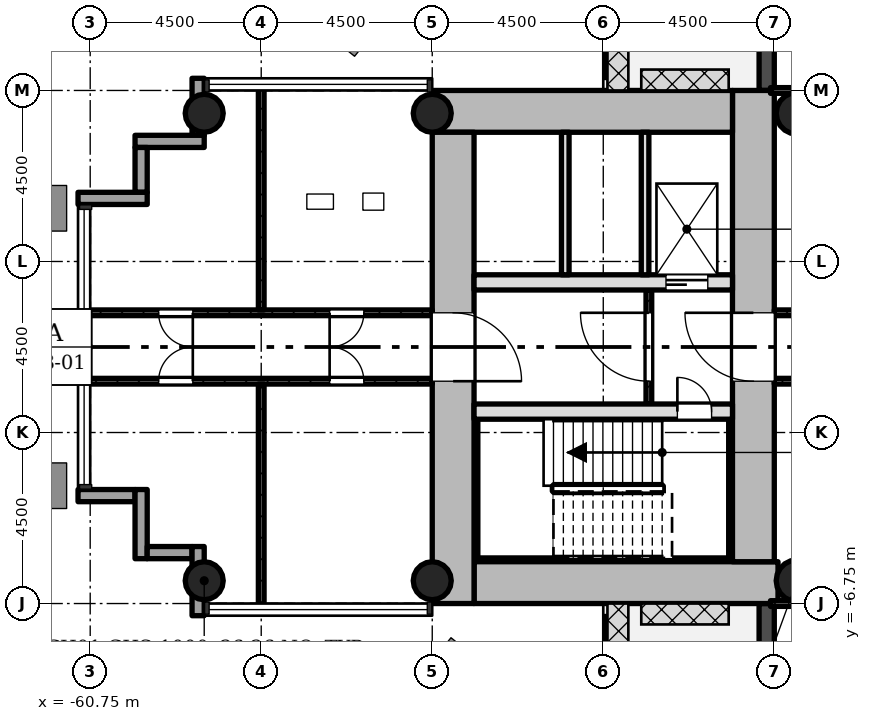
"""IFC4 building model, lengths in metres.
Left out: names, types, materials, properties, quantities, classifications, styles, units other than length and angle.
Written with IfcOpenShell. Run it as: python <this file> out.ifc"""

import sys

from ifc_helpers import new_model, si_unit, direction, frame, frame_2d, origin, origin_2d, place, context, subcontext, project, spatial, rectangle, hollow_circle, extrude, element, fill, save


model = new_model("IFC4")
c1 = context("Model", 3, precision=1e-05, world=origin(), true_north=direction((0.0, 1.0)))
c2 = subcontext(c1, "Body", "Model", "MODEL_VIEW")
j1 = project(units=[si_unit("LENGTHUNIT", "METRE"), si_unit("PLANEANGLEUNIT", "RADIAN")], contexts=[c1])
p1 = place(None, origin())
s1 = spatial("IfcSite", under=j1, at=p1, CompositionType="ELEMENT")
p2 = place(p1, origin())
s2 = spatial("IfcBuilding", under=s1, at=p2, CompositionType="ELEMENT")
p3 = place(p2, frame((0.0, 0.0, 72.1)))
s3 = spatial("IfcBuildingStorey", under=s2, at=p3, CompositionType="ELEMENT", Elevation=72.1)
p4 = place(p3, frame((-50.65, -6.2, 0.0), z_axis=(0.0, 0.0, 1.0), x_axis=(1.0, 0.0, 0.0)))
e1 = element("IfcWall", 1, at=p4, inside=s3, PredefinedType="SHEAR", context=c2, shape_type="SweptSolid", body=[
    extrude(rectangle(XDim=7.998, YDim=1.1, at=frame_2d((3.999, 0.0))), origin(), (0.0, 0.0, 1.0), 4.5),
])
p5 = place(p3, frame((-43.3, -5.65, 0.0), z_axis=(0.0, 0.0, 1.0), x_axis=(0.0, 1.0, 0.0)))
e2 = element("IfcWall", 2, at=p5, inside=s3, PredefinedType="SHEAR", context=c2, shape_type="SweptSolid", body=[
    extrude(rectangle(XDim=12.4, YDim=1.1, at=frame_2d((6.2, 0.0))), origin(), (0.0, 0.0, 1.0), 4.5),
])
p6 = place(p5, frame((4.75, 0.0, 0.0)))
e3 = element("IfcOpeningElement", 3, at=p6, cuts=e2, PredefinedType="OPENING", context=c2, shape_type="SweptSolid", body=[
    extrude(rectangle(XDim=1.8, YDim=2.1, at=frame_2d((0.9, 1.05))), frame((0.0, 0.56, 0.0), z_axis=(0.0, -1.0, 0.0), x_axis=(1.0, 0.0, 0.0)), (0.0, 0.0, 1.0), 1.12),
])
p7 = place(p3, frame((-43.85, 6.2, 0.0), z_axis=(0.0, 0.0, 1.0), x_axis=(-1.0, 0.0, 0.0)))
e4 = element("IfcWall", 4, at=p7, inside=s3, PredefinedType="SHEAR", context=c2, shape_type="SweptSolid", body=[
    extrude(rectangle(XDim=7.9, YDim=1.1, at=frame_2d((3.95, 0.0))), origin(), (0.0, 0.0, 1.0), 4.5),
])
p8 = place(p3, frame((-51.2, 5.65, 0.0), z_axis=(0.0, 0.0, 1.0), x_axis=(0.0, -1.0, 0.0)))
e5 = element("IfcWall", 5, at=p8, inside=s3, PredefinedType="SHEAR", context=c2, shape_type="SweptSolid", body=[
    extrude(rectangle(XDim=12.4, YDim=1.1, at=frame_2d((6.2, 0.0))), origin(), (0.0, 0.0, 1.0), 4.5),
])
p9 = place(p8, frame((4.75, 0.0, 0.0)))
e6 = element("IfcOpeningElement", 6, at=p9, cuts=e5, PredefinedType="OPENING", context=c2, shape_type="SweptSolid", body=[
    extrude(rectangle(XDim=1.8, YDim=2.1, at=frame_2d((0.9, 1.05))), frame((0.0, 0.56, 0.0), z_axis=(0.0, -1.0, 0.0), x_axis=(1.0, 0.0, 0.0)), (0.0, 0.0, 1.0), 1.12),
])
p10 = place(p3, frame((-50.65, -1.7, 0.0), z_axis=(0.0, 0.0, 1.0), x_axis=(1.0, 0.0, 0.0)))
e7 = element("IfcWall", 7, at=p10, inside=s3, PredefinedType="SHEAR", context=c2, shape_type="SweptSolid", body=[
    extrude(rectangle(XDim=6.8, YDim=0.4, at=frame_2d((3.4, 0.0))), origin(), (0.0, 0.0, 1.0), 4.5),
])
p11 = place(p10, frame((5.35, 0.0, 0.0)))
e8 = element("IfcOpeningElement", 8, at=p11, cuts=e7, PredefinedType="OPENING", context=c2, shape_type="SweptSolid", body=[
    extrude(rectangle(XDim=0.9, YDim=2.1, at=frame_2d((0.45, 1.05))), frame((0.0, 0.21, 0.0), z_axis=(0.0, -1.0, 0.0), x_axis=(1.0, 0.0, 0.0)), (0.0, 0.0, 1.0), 0.42),
])
p12 = place(p3, frame((-50.65, 1.7, 0.0), z_axis=(0.0, 0.0, 1.0), x_axis=(1.0, 0.0, 0.0)))
e9 = element("IfcWall", 9, at=p12, inside=s3, PredefinedType="SHEAR", context=c2, shape_type="SweptSolid", body=[
    extrude(rectangle(XDim=6.8, YDim=0.4, at=frame_2d((3.4, 0.0))), origin(), (0.0, 0.0, 1.0), 4.5),
])
p13 = place(p12, frame((5.05, 0.0, 0.0)))
e10 = element("IfcOpeningElement", 10, at=p13, cuts=e9, PredefinedType="OPENING", context=c2, shape_type="SweptSolid", body=[
    extrude(rectangle(XDim=1.1, YDim=2.1, at=frame_2d((0.55, 1.05))), frame((0.0, 0.21, 0.0), z_axis=(0.0, -1.0, 0.0), x_axis=(1.0, 0.0, 0.0)), (0.0, 0.0, 1.0), 0.42),
])
for number, where, z_axis, x_axis in (
    (11, (-51.75, -6.15, 0.0), (0.0, 0.0, 1.0), (1.0, 0.0, 0.0)),
    (12, (-51.75, 6.15, 0.0), (0.0, 0.0, 1.0), (1.0, 0.0, 0.0)),
    (13, (-57.75, -6.15, 0.0), (0.0, 0.0, 1.0), (1.0, 0.0, 0.0)),
    (14, (-57.75, 6.15, 0.0), (0.0, 0.0, 1.0), (1.0, 0.0, 0.0)),
):
    element("IfcColumn", number, at=place(p3, frame(where, z_axis=z_axis, x_axis=x_axis)), inside=s3, PredefinedType="COLUMN", context=c2, shape_type="SweptSolid", body=[
        extrude(hollow_circle(Radius=0.5, WallThickness=0.036, at=origin_2d()), origin(), (0.0, 0.0, 1.0), 4.5),
    ])
for number, where, z_axis, x_axis in (
    (15, (-42.15, -6.15, 0.0), (0.0, 0.0, 1.0), (1.0, 0.0, 0.0)),
    (16, (-42.15, 6.15, 0.0), (0.0, 0.0, 1.0), (1.0, 0.0, 0.0)),
):
    element("IfcColumn", number, at=place(p3, frame(where, z_axis=z_axis, x_axis=x_axis)), inside=s3, PredefinedType="COLUMN", context=c2, shape_type="SweptSolid", body=[
        extrude(hollow_circle(Radius=0.55, WallThickness=0.04, at=origin_2d()), origin(), (0.0, 0.0, 1.0), 4.5),
    ])
p14 = place(p3, frame((-61.07, -3.91, -0.3), z_axis=(0.0, 0.0, 1.0), x_axis=(1.0, 0.0, 0.0)))
e17 = element("IfcWall", 17, at=p14, inside=s3, PredefinedType="STANDARD", context=c2, shape_type="SweptSolid", body=[
    extrude(rectangle(XDim=1.5, YDim=0.32, at=frame_2d((0.75, 0.0))), origin(), (0.0, 0.0, 1.0), 4.5),
])
p15 = place(p3, frame((-59.41, -3.75, -0.3), z_axis=(0.0, 0.0, 1.0), x_axis=(0.0, -1.0, 0.0)))
e18 = element("IfcWall", 18, at=p15, inside=s3, PredefinedType="STANDARD", context=c2, shape_type="SweptSolid", body=[
    extrude(rectangle(XDim=1.82, YDim=0.32, at=frame_2d((0.91, 0.0))), origin(), (0.0, 0.0, 1.0), 4.5),
])
p16 = place(p3, frame((-59.25, -5.41, -0.3), z_axis=(0.0, 0.0, 1.0), x_axis=(1.0, 0.0, 0.0)))
e19 = element("IfcWall", 19, at=p16, inside=s3, PredefinedType="STANDARD", context=c2, shape_type="SweptSolid", body=[
    extrude(rectangle(XDim=1.18, YDim=0.32, at=frame_2d((0.59, 0.0))), origin(), (0.0, 0.0, 1.0), 4.5),
])
p17 = place(p3, frame((-57.91, -5.25, -0.3), z_axis=(0.0, 0.0, 1.0), x_axis=(0.0, -1.0, 0.0)))
e20 = element("IfcWall", 20, at=p17, inside=s3, PredefinedType="STANDARD", context=c2, shape_type="SweptSolid", body=[
    extrude(rectangle(XDim=1.82, YDim=0.32, at=frame_2d((0.91, 0.0))), origin(), (0.0, 0.0, 1.0), 4.5),
])
p18 = place(p3, frame((-42.95, -6.75, -0.02), z_axis=(0.0, 0.0, 1.0), x_axis=(0.0, -1.0, 0.0)))
e21 = element("IfcWall", 21, at=p18, inside=s3, PredefinedType="STANDARD", context=c2, shape_type="SweptSolid", body=[
    extrude(rectangle(XDim=4.5, YDim=0.4, at=frame_2d((2.25, 0.0))), origin(), (0.0, 0.0, 1.0), 4.22),
])
p19 = place(p18, frame((1.35, 0.0, 0.02)))
e22 = element("IfcOpeningElement", 22, at=p19, cuts=e21, PredefinedType="OPENING", context=c2, shape_type="SweptSolid", body=[
    extrude(rectangle(XDim=1.8, YDim=2.1, at=frame_2d((0.9, 1.05))), frame((0.0, 0.21, 0.0), z_axis=(0.0, -1.0, 0.0), x_axis=(1.0, 0.0, 0.0)), (0.0, 0.0, 1.0), 0.42),
])
p20 = place(p3, frame((-42.95, 11.25, -0.02), z_axis=(0.0, 0.0, 1.0), x_axis=(0.0, -1.0, 0.0)))
e23 = element("IfcWall", 23, at=p20, inside=s3, PredefinedType="STANDARD", context=c2, shape_type="SweptSolid", body=[
    extrude(rectangle(XDim=4.5, YDim=0.4, at=frame_2d((2.25, 0.0))), origin(), (0.0, 0.0, 1.0), 4.22),
])
p21 = place(p20, frame((1.35, 0.0, 0.02)))
e24 = element("IfcOpeningElement", 24, at=p21, cuts=e23, PredefinedType="OPENING", context=c2, shape_type="SweptSolid", body=[
    extrude(rectangle(XDim=1.8, YDim=2.1, at=frame_2d((0.9, 1.05))), frame((0.0, 0.21, 0.0), z_axis=(0.0, -1.0, 0.0), x_axis=(1.0, 0.0, 0.0)), (0.0, 0.0, 1.0), 0.42),
])
p22 = place(p3, frame((-57.91, 7.07, -0.3), z_axis=(0.0, 0.0, 1.0), x_axis=(0.0, -1.0, 0.0)))
e25 = element("IfcWall", 25, at=p22, inside=s3, PredefinedType="STANDARD", context=c2, shape_type="SweptSolid", body=[
    extrude(rectangle(XDim=1.5, YDim=0.32, at=frame_2d((0.75, 0.0))), origin(), (0.0, 0.0, 1.0), 4.5),
])
p23 = place(p3, frame((-57.75, 5.41, -0.3), z_axis=(0.0, 0.0, 1.0), x_axis=(-1.0, 0.0, 0.0)))
e26 = element("IfcWall", 26, at=p23, inside=s3, PredefinedType="STANDARD", context=c2, shape_type="SweptSolid", body=[
    extrude(rectangle(XDim=1.82, YDim=0.32, at=frame_2d((0.91, 0.0))), origin(), (0.0, 0.0, 1.0), 4.5),
])
p24 = place(p3, frame((-59.41, 5.25, -0.3), z_axis=(0.0, 0.0, 1.0), x_axis=(0.0, -1.0, 0.0)))
e27 = element("IfcWall", 27, at=p24, inside=s3, PredefinedType="STANDARD", context=c2, shape_type="SweptSolid", body=[
    extrude(rectangle(XDim=1.18, YDim=0.32, at=frame_2d((0.59, 0.0))), origin(), (0.0, 0.0, 1.0), 4.5),
])
p25 = place(p3, frame((-59.25, 3.91, -0.3), z_axis=(0.0, 0.0, 1.0), x_axis=(-1.0, 0.0, 0.0)))
e28 = element("IfcWall", 28, at=p25, inside=s3, PredefinedType="STANDARD", context=c2, shape_type="SweptSolid", body=[
    extrude(rectangle(XDim=1.82, YDim=0.32, at=frame_2d((0.91, 0.0))), origin(), (0.0, 0.0, 1.0), 4.5),
])
p26 = place(p3, frame((-46.05, 1.5, 0.0), z_axis=(0.0, 0.0, 1.0), x_axis=(0.0, -1.0, 0.0)))
e29 = element("IfcWall", 29, at=p26, inside=s3, PredefinedType="PARTITIONING", context=c2, shape_type="SweptSolid", body=[
    extrude(rectangle(XDim=3.0, YDim=0.15, at=frame_2d((1.5, 0.0))), origin(), (0.0, 0.0, 1.0), 4.08),
])
p27 = place(p26, frame((0.6, 0.0, 0.0)))
e30 = element("IfcOpeningElement", 30, at=p27, cuts=e29, PredefinedType="OPENING", context=c2, shape_type="SweptSolid", body=[
    extrude(rectangle(XDim=1.8, YDim=2.1, at=frame_2d((0.9, 1.05))), frame((0.0, 0.085, 0.0), z_axis=(0.0, -1.0, 0.0), x_axis=(1.0, 0.0, 0.0)), (0.0, 0.0, 1.0), 0.17),
])
for number, where, z_axis, x_axis in (
    (31, (-46.15, 5.65, 0.0), (0.0, 0.0, 1.0), (0.0, -1.0, 0.0)),
    (32, (-48.25, 5.65, 0.0), (0.0, 0.0, 1.0), (0.0, -1.0, 0.0)),
):
    element("IfcWall", number, at=place(p3, frame(where, z_axis=z_axis, x_axis=x_axis)), inside=s3, PredefinedType="SOLIDWALL", context=c2, shape_type="SweptSolid", body=[
        extrude(rectangle(XDim=3.75, YDim=0.2, at=frame_2d((1.875, 0.0))), origin(), (0.0, 0.0, 1.0), 4.08),
    ])
p28 = place(p3, frame((-42.75, 0.9, 0.0), z_axis=(0.0, 0.0, 1.0), x_axis=(1.0, 0.0, 0.0)))
e33 = element("IfcWall", 33, at=p28, inside=s3, PredefinedType="PARTITIONING", context=c2, shape_type="SweptSolid", body=[
    extrude(rectangle(XDim=5.85, YDim=0.15, at=frame_2d((2.925, 0.0))), origin(), (0.0, 0.0, 1.0), 4.08),
])
p29 = place(p28, frame((2.475, 0.0, 0.0)))
e34 = element("IfcOpeningElement", 34, at=p29, cuts=e33, PredefinedType="OPENING", context=c2, shape_type="SweptSolid", body=[
    extrude(rectangle(XDim=0.9, YDim=2.1, at=frame_2d((0.45, 1.05))), frame((0.0, 0.085, 0.0), z_axis=(0.0, -1.0, 0.0), x_axis=(1.0, 0.0, 0.0)), (0.0, 0.0, 1.0), 0.17),
])
p30 = place(p3, frame((-42.75, -0.9, 0.0), z_axis=(0.0, 0.0, 1.0), x_axis=(1.0, 0.0, 0.0)))
e35 = element("IfcWall", 35, at=p30, inside=s3, PredefinedType="PARTITIONING", context=c2, shape_type="SweptSolid", body=[
    extrude(rectangle(XDim=5.85, YDim=0.15, at=frame_2d((2.925, 0.0))), origin(), (0.0, 0.0, 1.0), 4.08),
])
p31 = place(p30, frame((2.475, 0.0, 0.0)))
e36 = element("IfcOpeningElement", 36, at=p31, cuts=e35, PredefinedType="OPENING", context=c2, shape_type="SweptSolid", body=[
    extrude(rectangle(XDim=0.9, YDim=2.1, at=frame_2d((0.45, 1.05))), frame((0.0, 0.085, 0.0), z_axis=(0.0, -1.0, 0.0), x_axis=(1.0, 0.0, 0.0)), (0.0, 0.0, 1.0), 0.17),
])
p32 = place(p3, frame((-60.85, 0.9, 0.0), z_axis=(0.0, 0.0, 1.0), x_axis=(1.0, 0.0, 0.0)))
e37 = element("IfcWall", 37, at=p32, inside=s3, PredefinedType="PARTITIONING", context=c2, shape_type="SweptSolid", body=[
    extrude(rectangle(XDim=9.1, YDim=0.15, at=frame_2d((4.55, 0.0))), origin(), (0.0, 0.0, 1.0), 4.08),
])
p33 = place(p32, frame((1.9, 0.0, 0.0)))
e38 = element("IfcOpeningElement", 38, at=p33, cuts=e37, PredefinedType="OPENING", context=c2, shape_type="SweptSolid", body=[
    extrude(rectangle(XDim=0.9, YDim=2.1, at=frame_2d((0.45, 1.05))), frame((0.0, 0.085, 0.0), z_axis=(0.0, -1.0, 0.0), x_axis=(1.0, 0.0, 0.0)), (0.0, 0.0, 1.0), 0.17),
])
p34 = place(p32, frame((6.4, 0.0, 0.0)))
e39 = element("IfcOpeningElement", 39, at=p34, cuts=e37, PredefinedType="OPENING", context=c2, shape_type="SweptSolid", body=[
    extrude(rectangle(XDim=0.9, YDim=2.1, at=frame_2d((0.45, 1.05))), frame((0.0, 0.085, 0.0), z_axis=(0.0, -1.0, 0.0), x_axis=(1.0, 0.0, 0.0)), (0.0, 0.0, 1.0), 0.17),
])
p35 = place(p3, frame((-56.25, 0.975, 0.0), z_axis=(0.0, 0.0, 1.0), x_axis=(0.0, 1.0, 0.0)))
e40 = element("IfcWall", 40, at=p35, inside=s3, PredefinedType="PARTITIONING", context=c2, shape_type="SweptSolid", body=[
    extrude(rectangle(XDim=5.875, YDim=0.15, at=frame_2d((2.938, 0.0))), origin(), (0.0, 0.0, 1.0), 4.08),
])
p36 = place(p3, frame((-60.85, -0.9, 0.0), z_axis=(0.0, 0.0, 1.0), x_axis=(1.0, 0.0, 0.0)))
e41 = element("IfcWall", 41, at=p36, inside=s3, PredefinedType="PARTITIONING", context=c2, shape_type="SweptSolid", body=[
    extrude(rectangle(XDim=9.1, YDim=0.15, at=frame_2d((4.55, 0.0))), origin(), (0.0, 0.0, 1.0), 4.08),
])
p37 = place(p36, frame((1.9, 0.0, 0.0)))
e42 = element("IfcOpeningElement", 42, at=p37, cuts=e41, PredefinedType="OPENING", context=c2, shape_type="SweptSolid", body=[
    extrude(rectangle(XDim=0.9, YDim=2.1, at=frame_2d((0.45, 1.05))), frame((0.0, 0.085, 0.0), z_axis=(0.0, -1.0, 0.0), x_axis=(1.0, 0.0, 0.0)), (0.0, 0.0, 1.0), 0.17),
])
p38 = place(p36, frame((6.4, 0.0, 0.0)))
e43 = element("IfcOpeningElement", 43, at=p38, cuts=e41, PredefinedType="OPENING", context=c2, shape_type="SweptSolid", body=[
    extrude(rectangle(XDim=0.9, YDim=2.1, at=frame_2d((0.45, 1.05))), frame((0.0, 0.085, 0.0), z_axis=(0.0, -1.0, 0.0), x_axis=(1.0, 0.0, 0.0)), (0.0, 0.0, 1.0), 0.17),
])
p39 = place(p3, frame((-56.25, -0.975, 0.0), z_axis=(0.0, 0.0, 1.0), x_axis=(0.0, -1.0, 0.0)))
e44 = element("IfcWall", 44, at=p39, inside=s3, PredefinedType="PARTITIONING", context=c2, shape_type="SweptSolid", body=[
    extrude(rectangle(XDim=5.875, YDim=0.15, at=frame_2d((2.938, 0.0))), origin(), (0.0, 0.0, 1.0), 4.08),
])
p40 = place(p3, frame((-42.85, 6.75, 0.0), z_axis=(0.0, 0.0, 1.0), x_axis=(1.0, 0.0, 0.0)))
e45 = element("IfcWall", 45, at=p40, inside=s3, PredefinedType="PARTITIONING", context=c2, shape_type="SweptSolid", body=[
    extrude(rectangle(XDim=13.7, YDim=0.15, at=frame_2d((6.85, 0.0))), origin(), (0.0, 0.0, 1.0), 4.08),
])
p41 = place(p40, frame((5.95, 0.0, 0.0)))
e46 = element("IfcOpeningElement", 46, at=p41, cuts=e45, PredefinedType="OPENING", context=c2, shape_type="SweptSolid", body=[
    extrude(rectangle(XDim=1.8, YDim=2.1, at=frame_2d((0.9, 1.05))), frame((0.0, 0.085, 0.0), z_axis=(0.0, -1.0, 0.0), x_axis=(1.0, 0.0, 0.0)), (0.0, 0.0, 1.0), 0.17),
])
p42 = place(p3, frame((-42.85, -6.75, 0.0), z_axis=(0.0, 0.0, 1.0), x_axis=(1.0, 0.0, 0.0)))
e47 = element("IfcWall", 47, at=p42, inside=s3, PredefinedType="PARTITIONING", context=c2, shape_type="SweptSolid", body=[
    extrude(rectangle(XDim=13.7, YDim=0.15, at=frame_2d((6.85, 0.0))), origin(), (0.0, 0.0, 1.0), 4.08),
])
p43 = place(p42, frame((5.95, 0.0, 0.0)))
e48 = element("IfcOpeningElement", 48, at=p43, cuts=e47, PredefinedType="OPENING", context=c2, shape_type="SweptSolid", body=[
    extrude(rectangle(XDim=1.8, YDim=2.1, at=frame_2d((0.9, 1.05))), frame((0.0, 0.085, 0.0), z_axis=(0.0, -1.0, 0.0), x_axis=(1.0, 0.0, 0.0)), (0.0, 0.0, 1.0), 0.17),
])
p44 = place(p3, frame((-50.6, -1.9, 0.0), z_axis=(0.0, 0.0, 1.0), x_axis=(0.0, -1.0, 0.0)))
e49 = element("IfcWall", 49, at=p44, inside=s3, PredefinedType="SHEAR", context=c2, shape_type="SweptSolid", body=[
    extrude(rectangle(XDim=3.75, YDim=0.1, at=frame_2d((1.875, 0.0))), origin(), (0.0, 0.0, 1.0), 4.5),
])
p45 = place(p3, frame((-43.95, -5.6, 0.0), z_axis=(0.0, 0.0, 1.0), x_axis=(-1.0, 0.0, 0.0)))
e50 = element("IfcWall", 50, at=p45, inside=s3, PredefinedType="SHEAR", context=c2, shape_type="SweptSolid", body=[
    extrude(rectangle(XDim=6.6, YDim=0.1, at=frame_2d((3.3, 0.0))), origin(), (0.0, 0.0, 1.0), 4.5),
])
p46 = place(p3, frame((-43.9, -1.9, 0.0), z_axis=(0.0, 0.0, 1.0), x_axis=(0.0, -1.0, 0.0)))
e51 = element("IfcWall", 51, at=p46, inside=s3, PredefinedType="SHEAR", context=c2, shape_type="SweptSolid", body=[
    extrude(rectangle(XDim=3.75, YDim=0.1, at=frame_2d((1.875, 0.0))), origin(), (0.0, 0.0, 1.0), 4.5),
])
p47 = place(p27, origin())
e52 = element("IfcDoor", 52, at=p47, inside=s3, OperationType="SINGLE_SWING_LEFT", PredefinedType="DOOR", context=c2, shape_type="SweptSolid", body=[
    extrude(rectangle(XDim=1.8, YDim=2.1, at=frame_2d((0.9, 1.05))), frame((0.0, 0.025, 0.0), z_axis=(0.0, -1.0, 0.0), x_axis=(1.0, 0.0, 0.0)), (0.0, 0.0, 1.0), 0.05),
])
fill(e30, e52)
p48 = place(p33, origin())
e53 = element("IfcDoor", 53, at=p48, inside=s3, OperationType="SINGLE_SWING_RIGHT", PredefinedType="DOOR", context=c2, shape_type="SweptSolid", body=[
    extrude(rectangle(XDim=0.9, YDim=2.1, at=frame_2d((0.45, 1.05))), frame((0.0, 0.025, 0.0), z_axis=(0.0, -1.0, 0.0), x_axis=(1.0, 0.0, 0.0)), (0.0, 0.0, 1.0), 0.05),
])
fill(e38, e53)
p49 = place(p34, origin())
e54 = element("IfcDoor", 54, at=p49, inside=s3, OperationType="SINGLE_SWING_LEFT", PredefinedType="DOOR", context=c2, shape_type="SweptSolid", body=[
    extrude(rectangle(XDim=0.9, YDim=2.1, at=frame_2d((0.45, 1.05))), frame((0.0, 0.025, 0.0), z_axis=(0.0, -1.0, 0.0), x_axis=(1.0, 0.0, 0.0)), (0.0, 0.0, 1.0), 0.05),
])
fill(e39, e54)
p50 = place(p37, origin())
e55 = element("IfcDoor", 55, at=p50, inside=s3, OperationType="SINGLE_SWING_LEFT", PredefinedType="DOOR", context=c2, shape_type="SweptSolid", body=[
    extrude(rectangle(XDim=0.9, YDim=2.1, at=frame_2d((0.45, 1.05))), frame((0.0, 0.025, 0.0), z_axis=(0.0, -1.0, 0.0), x_axis=(1.0, 0.0, 0.0)), (0.0, 0.0, 1.0), 0.05),
])
fill(e42, e55)
p51 = place(p38, origin())
e56 = element("IfcDoor", 56, at=p51, inside=s3, OperationType="SINGLE_SWING_RIGHT", PredefinedType="DOOR", context=c2, shape_type="SweptSolid", body=[
    extrude(rectangle(XDim=0.9, YDim=2.1, at=frame_2d((0.45, 1.05))), frame((0.0, 0.025, 0.0), z_axis=(0.0, -1.0, 0.0), x_axis=(1.0, 0.0, 0.0)), (0.0, 0.0, 1.0), 0.05),
])
fill(e43, e56)
p52 = place(p11, origin())
e57 = element("IfcDoor", 57, at=p52, inside=s3, OperationType="SINGLE_SWING_RIGHT", PredefinedType="DOOR", context=c2, shape_type="SweptSolid", body=[
    extrude(rectangle(XDim=0.9, YDim=2.1, at=frame_2d((0.45, 1.05))), frame((0.0, 0.025, 0.0), z_axis=(0.0, -1.0, 0.0), x_axis=(1.0, 0.0, 0.0)), (0.0, 0.0, 1.0), 0.05),
])
fill(e8, e57)
p53 = place(p13, origin())
e58 = element("IfcDoor", 58, at=p53, inside=s3, OperationType="SLIDING_TO_LEFT", PredefinedType="DOOR", context=c2, shape_type="SweptSolid", body=[
    extrude(rectangle(XDim=1.1, YDim=2.1, at=frame_2d((0.55, 1.05))), frame((0.0, 0.025, 0.0), z_axis=(0.0, -1.0, 0.0), x_axis=(1.0, 0.0, 0.0)), (0.0, 0.0, 1.0), 0.05),
])
fill(e10, e58)
p54 = place(p6, origin())
e59 = element("IfcDoor", 59, at=p54, inside=s3, OperationType="SINGLE_SWING_LEFT", PredefinedType="DOOR", context=c2, shape_type="SweptSolid", body=[
    extrude(rectangle(XDim=1.8, YDim=2.1, at=frame_2d((0.9, 1.05))), frame((0.0, 0.025, 0.0), z_axis=(0.0, -1.0, 0.0), x_axis=(1.0, 0.0, 0.0)), (0.0, 0.0, 1.0), 0.05),
])
fill(e3, e59)
p55 = place(p9, origin())
e60 = element("IfcDoor", 60, at=p55, inside=s3, OperationType="SINGLE_SWING_LEFT", PredefinedType="DOOR", context=c2, shape_type="SweptSolid", body=[
    extrude(rectangle(XDim=1.8, YDim=2.1, at=frame_2d((0.9, 1.05))), frame((0.0, 0.025, 0.0), z_axis=(0.0, -1.0, 0.0), x_axis=(1.0, 0.0, 0.0)), (0.0, 0.0, 1.0), 0.05),
])
fill(e6, e60)
save(model, sys.argv[1])
